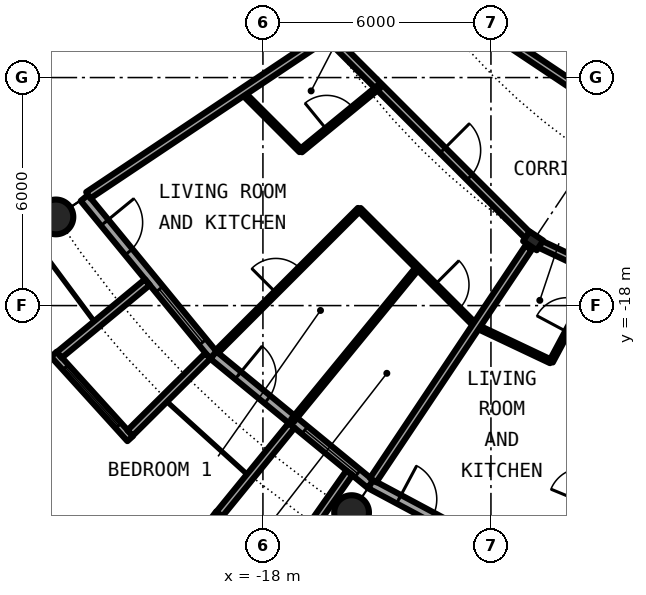
"""IFC4 building model, lengths in metres.
Left out: names, types, materials, properties, quantities, classifications, styles, units other than length and angle.
Written with IfcOpenShell. Run it as: python <this file> out.ifc"""

import sys

from ifc_helpers import new_model, si_unit, direction, frame, frame_2d, origin, origin_2d, place, context, subcontext, project, spatial, rectangle, circle, hollow_circle, i_section, extrude, element, fill, save


model = new_model("IFC4")
c1 = context("Model", 3, precision=1e-05, world=origin(), true_north=direction((0.0, 1.0)))
c2 = subcontext(c1, "Body", "Model", "MODEL_VIEW")
j1 = project(units=[si_unit("LENGTHUNIT", "METRE"), si_unit("PLANEANGLEUNIT", "RADIAN")], contexts=[c1])
p1 = place(None, origin())
s1 = spatial("IfcSite", under=j1, at=p1, CompositionType="ELEMENT")
p2 = place(p1, origin())
s2 = spatial("IfcBuilding", under=s1, at=p2, CompositionType="ELEMENT")
p3 = place(p2, frame((0.0, 0.0, 123.85)))
s3 = spatial("IfcBuildingStorey", under=s2, at=p3, CompositionType="ELEMENT", Elevation=123.85)
for number, where, z_axis, x_axis in (
    (1, (-23.448, -15.667, 0.0), (0.0, 0.0, 1.0), (1.0, 0.0, 0.0)),
    (2, (-15.667, -23.448, 0.0), (0.0, 0.0, 1.0), (1.0, 0.0, 0.0)),
):
    element("IfcColumn", number, at=place(p3, frame(where, z_axis=z_axis, x_axis=x_axis)), inside=s3, PredefinedType="COLUMN", context=c2, shape_type="SweptSolid", body=[
        extrude(hollow_circle(Radius=0.457, WallThickness=0.04, at=origin_2d()), origin(), (0.0, 0.0, 1.0), 3.05),
    ])
p4 = place(p3, frame((-10.889, -16.297, 0.0), z_axis=(0.0, 0.0, 1.0), x_axis=(-0.55557023302, -0.831469612303, 0.0)))
e3 = element("IfcColumn", 3, at=p4, inside=s3, PredefinedType="COLUMN", context=c2, shape_type="SweptSolid", body=[
    extrude(i_section(OverallWidth=0.307, OverallDepth=0.432, WebThickness=0.021, FlangeThickness=0.04, FilletRadius=0.027, at=origin_2d()), origin(), (0.0, 0.0, 1.0), 3.05),
])
p5 = place(p3, frame((-22.699, -15.167, 0.0), z_axis=(0.0, 0.0, 1.0), x_axis=(0.634382322723, -0.773019449054, 0.0)))
e4 = element("IfcWall", 4, at=p5, inside=s3, PredefinedType="SOLIDWALL", context=c2, shape_type="SweptSolid", body=[
    extrude(rectangle(XDim=5.352, YDim=0.25, at=frame_2d((2.676, 0.0))), origin(), (0.0, 0.0, 1.0), 2.7),
])
p6 = place(p5, frame((0.841, 0.0, 0.0)))
e5 = element("IfcOpeningElement", 5, at=p6, cuts=e4, PredefinedType="OPENING", context=c2, shape_type="SweptSolid", body=[
    extrude(rectangle(XDim=1.0, YDim=2.2, at=frame_2d((0.5, 1.1))), frame((0.0, 0.135, 0.0), z_axis=(0.0, -1.0, 0.0), x_axis=(1.0, 0.0, 0.0)), (0.0, 0.0, 1.0), 0.27),
])
p7 = place(p5, frame((3.111, 0.0, 0.3)))
e6 = element("IfcOpeningElement", 6, at=p7, cuts=e4, PredefinedType="OPENING", context=c2, shape_type="SweptSolid", body=[
    extrude(rectangle(XDim=1.8, YDim=2.1, at=frame_2d((0.9, 1.05))), frame((0.0, 0.135, 0.0), z_axis=(0.0, -1.0, 0.0), x_axis=(1.0, 0.0, 0.0)), (0.0, 0.0, 1.0), 0.27),
])
p8 = place(p3, frame((-23.503, -19.282, -0.03), z_axis=(0.0, 0.0, 1.0), x_axis=(0.671506829416, -0.740998365753, 0.0)))
e7 = element("IfcWall", 7, at=p8, inside=s3, PredefinedType="SOLIDWALL", context=c2, shape_type="SweptSolid", body=[
    extrude(rectangle(XDim=2.993, YDim=0.2, at=frame_2d((1.497, 0.0))), origin(), (0.0, 0.0, 1.0), 2.73),
])
p9 = place(p8, frame((0.457, 0.0, 0.33)))
e8 = element("IfcOpeningElement", 8, at=p9, cuts=e7, PredefinedType="OPENING", context=c2, shape_type="SweptSolid", body=[
    extrude(circle(Radius=1.04, at=frame_2d((1.04, 1.04))), frame((0.0, 0.11, 0.0), z_axis=(0.0, -1.0, 0.0), x_axis=(1.0, 0.0, 0.0)), (0.0, 0.0, 1.0), 0.22),
])
p10 = place(p3, frame((-21.041, -17.384, -0.03), z_axis=(0.0, 0.0, 1.0), x_axis=(-0.770784861449, -0.63709551667, 0.0)))
e9 = element("IfcWall", 9, at=p10, inside=s3, PredefinedType="SOLIDWALL", context=c2, shape_type="SweptSolid", body=[
    extrude(rectangle(XDim=3.006, YDim=0.2, at=frame_2d((1.503, 0.0))), origin(), (0.0, 0.0, 1.0), 2.73),
])
p11 = place(p3, frame((-19.45, -19.323, -0.03), z_axis=(0.0, 0.0, 1.0), x_axis=(-0.709727076896, -0.704476739375, 0.0)))
e10 = element("IfcWall", 10, at=p11, inside=s3, PredefinedType="SOLIDWALL", context=c2, shape_type="SweptSolid", body=[
    extrude(rectangle(XDim=2.883, YDim=0.2, at=frame_2d((1.441, 0.0))), origin(), (0.0, 0.0, 1.0), 2.73),
])
p12 = place(p3, frame((-19.304, -19.304, 0.0), z_axis=(0.0, 0.0, 1.0), x_axis=(0.773019449054, -0.634382322723, 0.0)))
e11 = element("IfcWall", 11, at=p12, inside=s3, PredefinedType="SOLIDWALL", context=c2, shape_type="SweptSolid", body=[
    extrude(rectangle(XDim=5.352, YDim=0.25, at=frame_2d((2.676, 0.0))), origin(), (0.0, 0.0, 1.0), 2.7),
])
p13 = place(p12, frame((0.841, 0.0, 0.0)))
e12 = element("IfcOpeningElement", 12, at=p13, cuts=e11, PredefinedType="OPENING", context=c2, shape_type="SweptSolid", body=[
    extrude(rectangle(XDim=1.0, YDim=2.2, at=frame_2d((0.5, 1.1))), frame((0.0, 0.135, 0.0), z_axis=(0.0, -1.0, 0.0), x_axis=(1.0, 0.0, 0.0)), (0.0, 0.0, 1.0), 0.27),
])
p14 = place(p12, frame((3.111, 0.0, 0.3)))
e13 = element("IfcOpeningElement", 13, at=p14, cuts=e11, PredefinedType="OPENING", context=c2, shape_type="SweptSolid", body=[
    extrude(rectangle(XDim=1.8, YDim=2.1, at=frame_2d((0.9, 1.05))), frame((0.0, 0.135, 0.0), z_axis=(0.0, -1.0, 0.0), x_axis=(1.0, 0.0, 0.0)), (0.0, 0.0, 1.0), 0.27),
])
p15 = place(p3, frame((-19.289, -23.497, -0.03), z_axis=(0.0, 0.0, 1.0), x_axis=(0.797456837111, -0.603375996329, 0.0)))
e14 = element("IfcWall", 14, at=p15, inside=s3, PredefinedType="SOLIDWALL", context=c2, shape_type="SweptSolid", body=[
    extrude(rectangle(XDim=2.391, YDim=0.2, at=frame_2d((1.196, 0.0))), origin(), (0.0, 0.0, 1.0), 2.73),
])
p16 = place(p15, frame((0.156, 0.0, 0.33)))
e15 = element("IfcOpeningElement", 15, at=p16, cuts=e14, PredefinedType="OPENING", context=c2, shape_type="SweptSolid", body=[
    extrude(circle(Radius=1.04, at=frame_2d((1.04, 1.04))), frame((0.0, 0.11, 0.0), z_axis=(0.0, -1.0, 0.0), x_axis=(1.0, 0.0, 0.0)), (0.0, 0.0, 1.0), 0.22),
])
p17 = place(p3, frame((-17.246, -21.155, -0.03), z_axis=(0.0, 0.0, 1.0), x_axis=(-0.631741648902, -0.775179004516, 0.0)))
e16 = element("IfcWall", 16, at=p17, inside=s3, PredefinedType="SOLIDWALL", context=c2, shape_type="SweptSolid", body=[
    extrude(rectangle(XDim=3.006, YDim=0.2, at=frame_2d((1.503, 0.0))), origin(), (0.0, 0.0, 1.0), 2.73),
])
p18 = place(p3, frame((-15.726, -22.402, -0.03), z_axis=(0.0, 0.0, 1.0), x_axis=(-0.574826383135, -0.818275399393, 0.0)))
e17 = element("IfcWall", 17, at=p18, inside=s3, PredefinedType="SOLIDWALL", context=c2, shape_type="SweptSolid", body=[
    extrude(rectangle(XDim=2.929, YDim=0.2, at=frame_2d((1.465, 0.0))), origin(), (0.0, 0.0, 1.0), 2.73),
])
p19 = place(p3, frame((-15.167, -22.699, 0.0), z_axis=(0.0, 0.0, 1.0), x_axis=(0.881915646801, -0.471407246368, 0.0)))
e18 = element("IfcWall", 18, at=p19, inside=s3, PredefinedType="SOLIDWALL", context=c2, shape_type="SweptSolid", body=[
    extrude(rectangle(XDim=5.352, YDim=0.25, at=frame_2d((2.676, 0.0))), origin(), (0.0, 0.0, 1.0), 2.7),
])
p20 = place(p19, frame((0.841, 0.0, 0.0)))
e19 = element("IfcOpeningElement", 19, at=p20, cuts=e18, PredefinedType="OPENING", context=c2, shape_type="SweptSolid", body=[
    extrude(rectangle(XDim=1.0, YDim=2.2, at=frame_2d((0.5, 1.1))), frame((0.0, 0.135, 0.0), z_axis=(0.0, -1.0, 0.0), x_axis=(1.0, 0.0, 0.0)), (0.0, 0.0, 1.0), 0.27),
])
p21 = place(p19, frame((3.111, 0.0, 0.3)))
e20 = element("IfcOpeningElement", 20, at=p21, cuts=e18, PredefinedType="OPENING", context=c2, shape_type="SweptSolid", body=[
    extrude(rectangle(XDim=1.8, YDim=2.1, at=frame_2d((0.9, 1.05))), frame((0.0, 0.135, 0.0), z_axis=(0.0, -1.0, 0.0), x_axis=(1.0, 0.0, 0.0)), (0.0, 0.0, 1.0), 0.27),
])
p22 = place(p3, frame((-12.397, -18.537, 0.0), z_axis=(0.0, 0.0, 1.0), x_axis=(0.903951937529, -0.427634066274, 0.0)))
e21 = element("IfcWall", 21, at=p22, inside=s3, PredefinedType="PARTITIONING", context=c2, shape_type="SweptSolid", body=[
    extrude(rectangle(XDim=2.181, YDim=0.1, at=frame_2d((1.091, 0.0))), origin(), (0.0, 0.0, 1.0), 2.7),
])
p23 = place(p3, frame((-18.542, -12.389, 0.0), z_axis=(0.0, 0.0, 1.0), x_axis=(0.707106781187, -0.707106781187, 0.0)))
e22 = element("IfcWall", 22, at=p23, inside=s3, PredefinedType="PARTITIONING", context=c2, shape_type="SweptSolid", body=[
    extrude(rectangle(XDim=2.175, YDim=0.1, at=frame_2d((1.088, 0.0))), origin(), (0.0, 0.0, 1.0), 2.7),
])
p24 = place(p3, frame((-15.463, -15.468, 0.0), z_axis=(0.0, 0.0, 1.0), x_axis=(0.707106781187, -0.707106781187, 0.0)))
e23 = element("IfcWall", 23, at=p24, inside=s3, PredefinedType="PARTITIONING", context=c2, shape_type="SweptSolid", body=[
    extrude(rectangle(XDim=4.351, YDim=0.1, at=frame_2d((2.176, 0.0))), origin(), (0.0, 0.0, 1.0), 2.7),
])
p25 = place(p24, frame((2.808, 0.0, 0.0)))
e24 = element("IfcOpeningElement", 24, at=p25, cuts=e23, PredefinedType="OPENING", context=c2, shape_type="SweptSolid", body=[
    extrude(rectangle(XDim=0.9, YDim=2.3, at=frame_2d((0.45, 1.15))), frame((0.0, 0.06, 0.0), z_axis=(0.0, -1.0, 0.0), x_axis=(1.0, 0.0, 0.0)), (0.0, 0.0, 1.0), 0.12),
])
p26 = place(p3, frame((-10.749, -16.363, 0.0), z_axis=(0.0, 0.0, 1.0), x_axis=(0.903968655954, -0.427598724335, 0.0)))
e25 = element("IfcWall", 25, at=p26, inside=s3, PredefinedType="PARTITIONING", context=c2, shape_type="SweptSolid", body=[
    extrude(rectangle(XDim=5.596, YDim=0.2, at=frame_2d((2.798, 0.0))), origin(), (0.0, 0.0, 1.0), 2.39),
])
p27 = place(p26, frame((3.179, 0.0, 0.0)))
e26 = element("IfcOpeningElement", 26, at=p27, cuts=e25, PredefinedType="OPENING", context=c2, shape_type="SweptSolid", body=[
    extrude(rectangle(XDim=1.0, YDim=2.3, at=frame_2d((0.5, 1.15))), frame((0.0, 0.11, 0.0), z_axis=(0.0, -1.0, 0.0), x_axis=(1.0, 0.0, 0.0)), (0.0, 0.0, 1.0), 0.22),
])
p28 = place(p3, frame((-16.186, -11.0, 0.0), z_axis=(0.0, 0.0, 1.0), x_axis=(0.707106781187, -0.707106781187, 0.0)))
e27 = element("IfcWall", 27, at=p28, inside=s3, PredefinedType="PARTITIONING", context=c2, shape_type="SweptSolid", body=[
    extrude(rectangle(XDim=7.334, YDim=0.2, at=frame_2d((3.667, 0.0))), origin(), (0.0, 0.0, 1.0), 2.39),
])
p29 = place(p28, frame((4.123, 0.0, 0.0)))
e28 = element("IfcOpeningElement", 28, at=p29, cuts=e27, PredefinedType="OPENING", context=c2, shape_type="SweptSolid", body=[
    extrude(rectangle(XDim=1.0, YDim=2.3, at=frame_2d((0.5, 1.15))), frame((0.0, 0.11, 0.0), z_axis=(0.0, -1.0, 0.0), x_axis=(1.0, 0.0, 0.0)), (0.0, 0.0, 1.0), 0.22),
])
p30 = place(p3, frame((-12.706, -10.291, 0.0), z_axis=(0.0, 0.0, 1.0), x_axis=(0.831588572532, -0.555392155178, 0.0)))
e29 = element("IfcWall", 29, at=p30, inside=s3, PredefinedType="PARTITIONING", context=c2, shape_type="SweptSolid", body=[
    extrude(rectangle(XDim=11.314, YDim=0.2, at=frame_2d((5.657, 0.0))), origin(), (0.0, 0.0, 1.0), 2.7),
])
p31 = place(p30, frame((5.966, 0.0, 0.0)))
e30 = element("IfcOpeningElement", 30, at=p31, cuts=e29, PredefinedType="OPENING", context=c2, shape_type="SweptSolid", body=[
    extrude(rectangle(XDim=1.0, YDim=2.3, at=frame_2d((0.5, 1.15))), frame((0.0, 0.11, 0.0), z_axis=(0.0, -1.0, 0.0), x_axis=(1.0, 0.0, 0.0)), (0.0, 0.0, 1.0), 0.22),
])
p32 = place(p3, frame((-22.595, -15.097, 0.0), z_axis=(0.0, 0.0, 1.0), x_axis=(0.831467903109, 0.555572791, 0.0)))
e31 = element("IfcWall", 31, at=p32, inside=s3, PredefinedType="PARTITIONING", context=c2, shape_type="SweptSolid", body=[
    extrude(rectangle(XDim=7.358, YDim=0.2, at=frame_2d((3.679, 0.0))), origin(), (0.0, 0.0, 1.0), 2.7),
])
p33 = place(p3, frame((-19.216, -19.216, 0.0), z_axis=(0.0, 0.0, 1.0), x_axis=(0.707106781187, 0.707106781187, 0.0)))
e32 = element("IfcWall", 32, at=p33, inside=s3, PredefinedType="PARTITIONING", context=c2, shape_type="SweptSolid", body=[
    extrude(rectangle(XDim=5.305, YDim=0.1, at=frame_2d((2.652, 0.0))), origin(), (0.0, 0.0, 1.0), 2.7),
])
p34 = place(p33, frame((2.202, 0.0, 0.0)))
e33 = element("IfcOpeningElement", 33, at=p34, cuts=e32, PredefinedType="OPENING", context=c2, shape_type="SweptSolid", body=[
    extrude(rectangle(XDim=0.9, YDim=2.3, at=frame_2d((0.45, 1.15))), frame((0.0, 0.06, 0.0), z_axis=(0.0, -1.0, 0.0), x_axis=(1.0, 0.0, 0.0)), (0.0, 0.0, 1.0), 0.12),
])
p35 = place(p3, frame((-17.22, -21.023, 0.0), z_axis=(0.0, 0.0, 1.0), x_axis=(0.633774976367, 0.773517471898, 0.0)))
e34 = element("IfcWall", 34, at=p35, inside=s3, PredefinedType="PARTITIONING", context=c2, shape_type="SweptSolid", body=[
    extrude(rectangle(XDim=5.196, YDim=0.1, at=frame_2d((2.598, 0.0))), origin(), (0.0, 0.0, 1.0), 2.7),
])
p36 = place(p3, frame((-17.004, -13.927, 0.0), z_axis=(0.0, 0.0, 1.0), x_axis=(0.77367517848, 0.633582447834, 0.0)))
e35 = element("IfcWall", 35, at=p36, inside=s3, PredefinedType="PARTITIONING", context=c2, shape_type="SweptSolid", body=[
    extrude(rectangle(XDim=2.661, YDim=0.1, at=frame_2d((1.331, 0.0))), origin(), (0.0, 0.0, 1.0), 2.7),
])
p37 = place(p36, frame((0.881, 0.0, 0.0)))
e36 = element("IfcOpeningElement", 36, at=p37, cuts=e35, PredefinedType="OPENING", context=c2, shape_type="SweptSolid", body=[
    extrude(rectangle(XDim=0.9, YDim=2.3, at=frame_2d((0.45, 1.15))), frame((0.0, 0.06, 0.0), z_axis=(0.0, -1.0, 0.0), x_axis=(1.0, 0.0, 0.0)), (0.0, 0.0, 1.0), 0.12),
])
p38 = place(p3, frame((-15.1, -22.594, 0.0), z_axis=(0.0, 0.0, 1.0), x_axis=(0.555779189795, 0.831329953864, 0.0)))
e37 = element("IfcWall", 37, at=p38, inside=s3, PredefinedType="PARTITIONING", context=c2, shape_type="SweptSolid", body=[
    extrude(rectangle(XDim=7.359, YDim=0.2, at=frame_2d((3.68, 0.0))), origin(), (0.0, 0.0, 1.0), 2.7),
])
p39 = place(p3, frame((-10.417, -19.474, 0.0), z_axis=(0.0, 0.0, 1.0), x_axis=(0.471701791767, 0.881758141241, 0.0)))
e38 = element("IfcWall", 38, at=p39, inside=s3, PredefinedType="PARTITIONING", context=c2, shape_type="SweptSolid", body=[
    extrude(rectangle(XDim=2.673, YDim=0.1, at=frame_2d((1.337, 0.0))), origin(), (0.0, 0.0, 1.0), 2.7),
])
p40 = place(p39, frame((0.887, 0.0, 0.0)))
e39 = element("IfcOpeningElement", 39, at=p40, cuts=e38, PredefinedType="OPENING", context=c2, shape_type="SweptSolid", body=[
    extrude(rectangle(XDim=0.9, YDim=2.3, at=frame_2d((0.45, 1.15))), frame((0.0, 0.06, 0.0), z_axis=(0.0, -1.0, 0.0), x_axis=(1.0, 0.0, 0.0)), (0.0, 0.0, 1.0), 0.12),
])
p41 = place(p3, frame((-10.391, -25.11, 0.0), z_axis=(0.0, 0.0, 1.0), x_axis=(0.382339082848, 0.92402209158, 0.0)))
e40 = element("IfcWall", 40, at=p41, inside=s3, PredefinedType="PARTITIONING", context=c2, shape_type="SweptSolid", body=[
    extrude(rectangle(XDim=5.09, YDim=0.1, at=frame_2d((2.545, 0.0))), origin(), (0.0, 0.0, 1.0), 2.7),
])
p42 = place(p41, frame((2.095, 0.0, 0.0)))
e41 = element("IfcOpeningElement", 41, at=p42, cuts=e40, PredefinedType="OPENING", context=c2, shape_type="SweptSolid", body=[
    extrude(rectangle(XDim=0.9, YDim=2.3, at=frame_2d((0.45, 1.15))), frame((0.0, 0.06, 0.0), z_axis=(0.0, -1.0, 0.0), x_axis=(1.0, 0.0, 0.0)), (0.0, 0.0, 1.0), 0.12),
])
p43 = place(p6, origin())
e42 = element("IfcDoor", 42, at=p43, inside=s3, OperationType="SINGLE_SWING_LEFT", PredefinedType="DOOR", context=c2, shape_type="SweptSolid", body=[
    extrude(rectangle(XDim=1.0, YDim=2.2, at=frame_2d((0.5, 1.1))), frame((0.0, 0.025, 0.0), z_axis=(0.0, -1.0, 0.0), x_axis=(1.0, 0.0, 0.0)), (0.0, 0.0, 1.0), 0.05),
])
fill(e5, e42)
p44 = place(p7, origin())
e43 = element("IfcWindow", 43, at=p44, inside=s3, PartitioningType="SINGLE_PANEL", PredefinedType="WINDOW", context=c2, shape_type="SweptSolid", body=[
    extrude(rectangle(XDim=1.8, YDim=2.1, at=frame_2d((0.9, 1.05))), frame((0.0, 0.03, 0.0), z_axis=(0.0, -1.0, 0.0), x_axis=(1.0, 0.0, 0.0)), (0.0, 0.0, 1.0), 0.06),
])
fill(e6, e43)
p45 = place(p9, origin())
e44 = element("IfcWindow", 44, at=p45, inside=s3, PartitioningType="SINGLE_PANEL", PredefinedType="WINDOW", context=c2, shape_type="SweptSolid", body=[
    extrude(circle(Radius=1.04, at=frame_2d((1.04, 1.04))), frame((0.0, 0.03, 0.0), z_axis=(0.0, -1.0, 0.0), x_axis=(1.0, 0.0, 0.0)), (0.0, 0.0, 1.0), 0.06),
])
fill(e8, e44)
p46 = place(p13, origin())
e45 = element("IfcDoor", 45, at=p46, inside=s3, OperationType="SINGLE_SWING_LEFT", PredefinedType="DOOR", context=c2, shape_type="SweptSolid", body=[
    extrude(rectangle(XDim=1.0, YDim=2.2, at=frame_2d((0.5, 1.1))), frame((0.0, 0.025, 0.0), z_axis=(0.0, -1.0, 0.0), x_axis=(1.0, 0.0, 0.0)), (0.0, 0.0, 1.0), 0.05),
])
fill(e12, e45)
p47 = place(p14, origin())
e46 = element("IfcWindow", 46, at=p47, inside=s3, PartitioningType="SINGLE_PANEL", PredefinedType="WINDOW", context=c2, shape_type="SweptSolid", body=[
    extrude(rectangle(XDim=1.8, YDim=2.1, at=frame_2d((0.9, 1.05))), frame((0.0, 0.03, 0.0), z_axis=(0.0, -1.0, 0.0), x_axis=(1.0, 0.0, 0.0)), (0.0, 0.0, 1.0), 0.06),
])
fill(e13, e46)
p48 = place(p20, origin())
e47 = element("IfcDoor", 47, at=p48, inside=s3, OperationType="SINGLE_SWING_LEFT", PredefinedType="DOOR", context=c2, shape_type="SweptSolid", body=[
    extrude(rectangle(XDim=1.0, YDim=2.2, at=frame_2d((0.5, 1.1))), frame((0.0, 0.025, 0.0), z_axis=(0.0, -1.0, 0.0), x_axis=(1.0, 0.0, 0.0)), (0.0, 0.0, 1.0), 0.05),
])
fill(e19, e47)
p49 = place(p29, origin())
e48 = element("IfcDoor", 48, at=p49, inside=s3, OperationType="SINGLE_SWING_RIGHT", PredefinedType="DOOR", context=c2, shape_type="SweptSolid", body=[
    extrude(rectangle(XDim=1.0, YDim=2.3, at=frame_2d((0.5, 1.15))), frame((0.0, 0.025, 0.0), z_axis=(0.0, -1.0, 0.0), x_axis=(1.0, 0.0, 0.0)), (0.0, 0.0, 1.0), 0.05),
])
fill(e28, e48)
p50 = place(p37, origin())
e49 = element("IfcDoor", 49, at=p50, inside=s3, OperationType="SINGLE_SWING_RIGHT", PredefinedType="DOOR", context=c2, shape_type="SweptSolid", body=[
    extrude(rectangle(XDim=0.9, YDim=2.3, at=frame_2d((0.45, 1.15))), frame((0.0, 0.025, 0.0), z_axis=(0.0, -1.0, 0.0), x_axis=(1.0, 0.0, 0.0)), (0.0, 0.0, 1.0), 0.05),
])
fill(e36, e49)
p51 = place(p34, origin())
e50 = element("IfcDoor", 50, at=p51, inside=s3, OperationType="SINGLE_SWING_LEFT", PredefinedType="DOOR", context=c2, shape_type="SweptSolid", body=[
    extrude(rectangle(XDim=0.9, YDim=2.3, at=frame_2d((0.45, 1.15))), frame((0.0, 0.025, 0.0), z_axis=(0.0, -1.0, 0.0), x_axis=(1.0, 0.0, 0.0)), (0.0, 0.0, 1.0), 0.05),
])
fill(e33, e50)
p52 = place(p25, origin())
e51 = element("IfcDoor", 51, at=p52, inside=s3, OperationType="SINGLE_SWING_RIGHT", PredefinedType="DOOR", context=c2, shape_type="SweptSolid", body=[
    extrude(rectangle(XDim=0.9, YDim=2.3, at=frame_2d((0.45, 1.15))), frame((0.0, 0.025, 0.0), z_axis=(0.0, -1.0, 0.0), x_axis=(1.0, 0.0, 0.0)), (0.0, 0.0, 1.0), 0.05),
])
fill(e24, e51)
p53 = place(p40, origin())
e52 = element("IfcDoor", 52, at=p53, inside=s3, OperationType="SINGLE_SWING_RIGHT", PredefinedType="DOOR", context=c2, shape_type="SweptSolid", body=[
    extrude(rectangle(XDim=0.9, YDim=2.3, at=frame_2d((0.45, 1.15))), frame((0.0, 0.025, 0.0), z_axis=(0.0, -1.0, 0.0), x_axis=(1.0, 0.0, 0.0)), (0.0, 0.0, 1.0), 0.05),
])
fill(e39, e52)
save(model, sys.argv[1])
